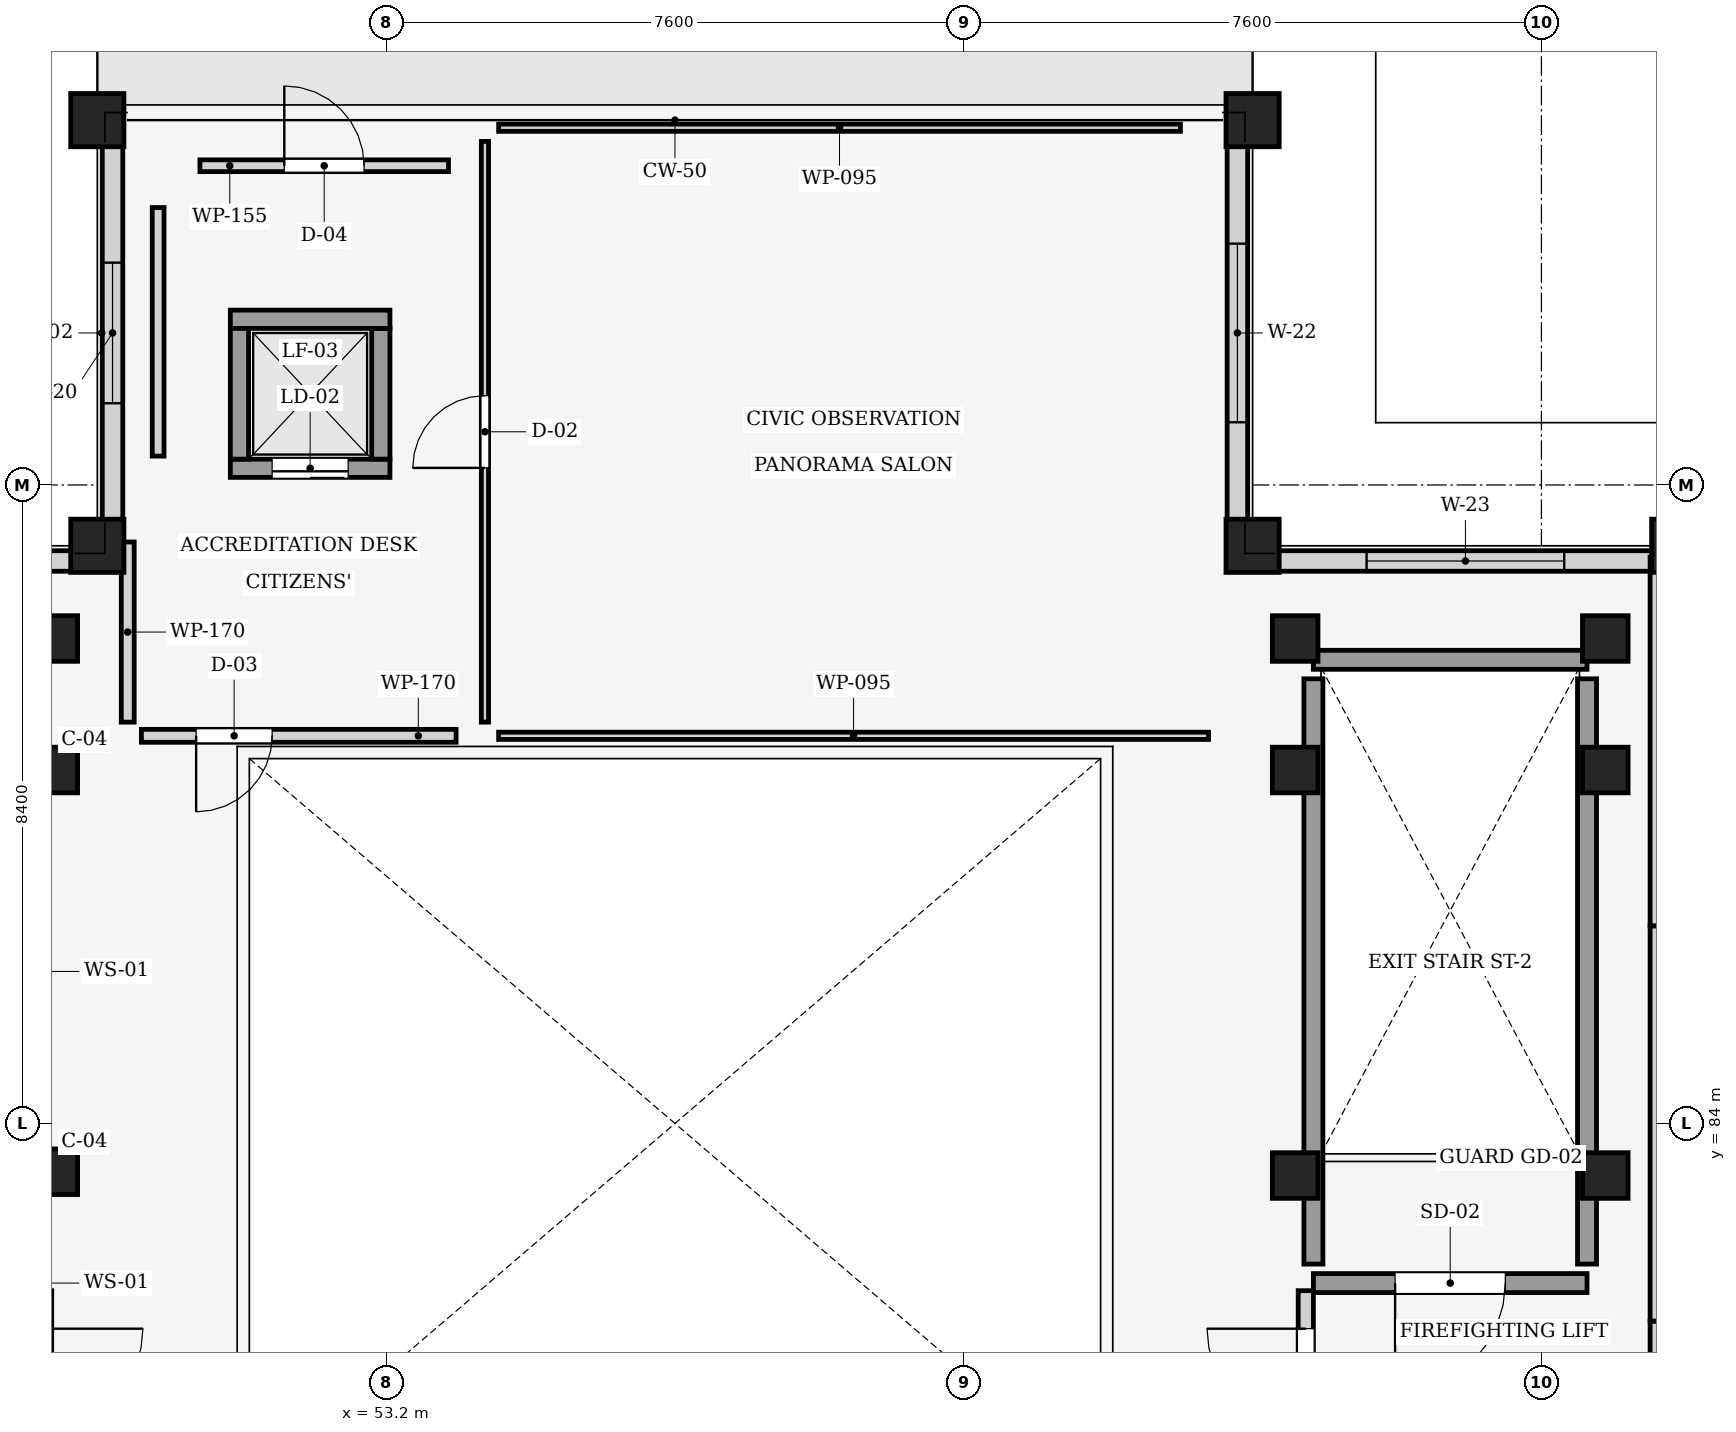
"""IFC4 building model, lengths in metres.
Left out: names, types, materials, properties, quantities, classifications, styles, units other than length and angle.
Written with IfcOpenShell. Run it as: python <this file> out.ifc"""

import sys

from ifc_helpers import new_model, si_unit, direction, frame, frame_2d, origin, origin_2d, place, context, subcontext, project, spatial, rectangle, extrude, element, fill, save


model = new_model("IFC4")
c1 = context("Model", 3, precision=1e-05, world=origin(), true_north=direction((0.0, 1.0)))
c2 = subcontext(c1, "Body", "Model", "MODEL_VIEW")
j1 = project(units=[si_unit("LENGTHUNIT", "METRE"), si_unit("PLANEANGLEUNIT", "RADIAN")], contexts=[c1])
p1 = place(None, origin())
s1 = spatial("IfcSite", under=j1, at=p1, CompositionType="ELEMENT")
p2 = place(p1, origin())
s2 = spatial("IfcBuilding", under=s1, at=p2, CompositionType="ELEMENT")
p3 = place(p2, frame((0.0, 0.0, 29.4)))
s3 = spatial("IfcBuildingStorey", under=s2, at=p3, CompositionType="ELEMENT", Elevation=29.4)
for number, where, z_axis, x_axis in (
    (1, (49.4, 91.6, 0.0), (0.0, 0.0, 1.0), (1.0, 0.0, 0.0)),
    (2, (49.4, 97.2, 0.0), (0.0, 0.0, 1.0), (1.0, 0.0, 0.0)),
    (3, (64.6, 91.6, 0.0), (0.0, 0.0, 1.0), (1.0, 0.0, 0.0)),
    (4, (64.6, 97.2, 0.0), (0.0, 0.0, 1.0), (1.0, 0.0, 0.0)),
):
    element("IfcColumn", number, at=place(p3, frame(where, z_axis=z_axis, x_axis=x_axis)), inside=s3, PredefinedType="COLUMN", context=c2, shape_type="SweptSolid", body=[
        extrude(rectangle(XDim=0.7, YDim=0.7, at=origin_2d()), origin(), (0.0, 0.0, 1.0), 5.0),
    ])
p4 = place(p3, frame((70.2, 91.6, 0.0), z_axis=(0.0, 0.0, 1.0), x_axis=(1.0, 0.0, 0.0)))
e5 = element("IfcColumn", 5, at=p4, inside=s3, PredefinedType="COLUMN", context=c2, shape_type="SweptSolid", body=[
    extrude(rectangle(XDim=0.7, YDim=0.7, at=origin_2d()), origin(), (0.0, 0.0, 1.0), 8.14),
])
for number, where, z_axis, x_axis in (
    (6, (48.84, 83.365, 0.0), (0.0, 0.0, 1.0), (1.0, 0.0, 0.0)),
    (7, (48.84, 88.65, 0.0), (0.0, 0.0, 1.0), (1.0, 0.0, 0.0)),
    (8, (48.84, 90.38, 0.0), (0.0, 0.0, 1.0), (1.0, 0.0, 0.0)),
    (9, (69.24, 83.315, 0.0), (0.0, 0.0, 1.0), (1.0, 0.0, 0.0)),
    (10, (65.16, 83.315, 0.0), (0.0, 0.0, 1.0), (1.0, 0.0, 0.0)),
    (11, (69.24, 88.65, 0.0), (0.0, 0.0, 1.0), (1.0, 0.0, 0.0)),
    (12, (65.16, 88.65, 0.0), (0.0, 0.0, 1.0), (1.0, 0.0, 0.0)),
    (13, (69.24, 90.38, 0.0), (0.0, 0.0, 1.0), (1.0, 0.0, 0.0)),
    (14, (65.16, 90.38, 0.0), (0.0, 0.0, 1.0), (1.0, 0.0, 0.0)),
):
    element("IfcColumn", number, at=place(p3, frame(where, z_axis=z_axis, x_axis=x_axis)), inside=s3, PredefinedType="COLUMN", context=c2, shape_type="SweptSolid", body=[
        extrude(rectangle(XDim=0.6, YDim=0.6, at=origin_2d()), origin(), (0.0, 0.0, 1.0), 4.75),
    ])
p5 = place(p3, frame((44.085, 91.4, 0.0), z_axis=(0.0, 0.0, 1.0), x_axis=(1.0, 0.0, 0.0)))
e15 = element("IfcWall", 15, at=p5, inside=s3, PredefinedType="STANDARD", context=c2, shape_type="SweptSolid", body=[
    extrude(rectangle(XDim=5.03, YDim=0.27, at=frame_2d((2.515, 0.0))), origin(), (0.0, 0.0, 1.0), 4.425),
])
p6 = place(p5, frame((1.715, 0.0, 0.85)))
e16 = element("IfcOpeningElement", 16, at=p6, cuts=e15, PredefinedType="OPENING", context=c2, shape_type="SweptSolid", body=[
    extrude(rectangle(XDim=1.6, YDim=1.65, at=frame_2d((0.8, 0.825))), frame((0.0, 0.145, 0.0), z_axis=(0.0, -1.0, 0.0), x_axis=(1.0, 0.0, 0.0)), (0.0, 0.0, 1.0), 0.29),
])
p7 = place(p3, frame((49.6, 91.885, 0.0), z_axis=(0.0, 0.0, 1.0), x_axis=(0.0, 1.0, 0.0)))
e17 = element("IfcWall", 17, at=p7, inside=s3, PredefinedType="STANDARD", context=c2, shape_type="SweptSolid", body=[
    extrude(rectangle(XDim=5.03, YDim=0.27, at=frame_2d((2.515, 0.0))), origin(), (0.0, 0.0, 1.0), 4.425),
])
p8 = place(p7, frame((1.59, 0.0, 0.85)))
e18 = element("IfcOpeningElement", 18, at=p8, cuts=e17, PredefinedType="OPENING", context=c2, shape_type="SweptSolid", body=[
    extrude(rectangle(XDim=1.85, YDim=1.65, at=frame_2d((0.925, 0.825))), frame((0.0, 0.145, 0.0), z_axis=(0.0, -1.0, 0.0), x_axis=(1.0, 0.0, 0.0)), (0.0, 0.0, 1.0), 0.29),
])
p9 = place(p3, frame((64.4, 96.915, 0.0), z_axis=(0.0, 0.0, 1.0), x_axis=(0.0, -1.0, 0.0)))
e19 = element("IfcWall", 19, at=p9, inside=s3, PredefinedType="STANDARD", context=c2, shape_type="SweptSolid", body=[
    extrude(rectangle(XDim=5.03, YDim=0.27, at=frame_2d((2.515, 0.0))), origin(), (0.0, 0.0, 1.0), 4.425),
])
p10 = place(p9, frame((1.34, 0.0, 0.85)))
e20 = element("IfcOpeningElement", 20, at=p10, cuts=e19, PredefinedType="OPENING", context=c2, shape_type="SweptSolid", body=[
    extrude(rectangle(XDim=2.35, YDim=1.65, at=frame_2d((1.175, 0.825))), frame((0.0, 0.145, 0.0), z_axis=(0.0, -1.0, 0.0), x_axis=(1.0, 0.0, 0.0)), (0.0, 0.0, 1.0), 0.29),
])
p11 = place(p3, frame((64.885, 91.4, 0.0), z_axis=(0.0, 0.0, 1.0), x_axis=(1.0, 0.0, 0.0)))
e21 = element("IfcWall", 21, at=p11, inside=s3, PredefinedType="STANDARD", context=c2, shape_type="SweptSolid", body=[
    extrude(rectangle(XDim=5.03, YDim=0.27, at=frame_2d((2.515, 0.0))), origin(), (0.0, 0.0, 1.0), 4.425),
])
p12 = place(p11, frame((1.215, 0.0, 0.85)))
e22 = element("IfcOpeningElement", 22, at=p12, cuts=e21, PredefinedType="OPENING", context=c2, shape_type="SweptSolid", body=[
    extrude(rectangle(XDim=2.6, YDim=1.65, at=frame_2d((1.3, 0.825))), frame((0.0, 0.145, 0.0), z_axis=(0.0, -1.0, 0.0), x_axis=(1.0, 0.0, 0.0)), (0.0, 0.0, 1.0), 0.29),
])
p13 = place(p3, frame((69.95, 81.4, 4.7), z_axis=(0.0, 0.0, 1.0), x_axis=(0.0, -1.0, 0.0)))
e23 = element("IfcWall", 23, at=p13, inside=s3, PredefinedType="STANDARD", context=c2, shape_type="SweptSolid", body=[
    extrude(rectangle(XDim=4.85, YDim=0.24, at=frame_2d((2.425, 0.0))), origin(), (0.0, 0.0, 1.0), 3.8),
])
p14 = place(p3, frame((69.95, 86.6, 4.7), z_axis=(0.0, 0.0, 1.0), x_axis=(0.0, -1.0, 0.0)))
e24 = element("IfcWall", 24, at=p14, inside=s3, PredefinedType="STANDARD", context=c2, shape_type="SweptSolid", body=[
    extrude(rectangle(XDim=5.2, YDim=0.24, at=frame_2d((2.6, 0.0))), origin(), (0.0, 0.0, 1.0), 4.85),
])
p15 = place(p3, frame((69.95, 91.45, 4.7), z_axis=(0.0, 0.0, 1.0), x_axis=(0.0, -1.0, 0.0)))
e25 = element("IfcWall", 25, at=p15, inside=s3, PredefinedType="STANDARD", context=c2, shape_type="SweptSolid", body=[
    extrude(rectangle(XDim=4.85, YDim=0.24, at=frame_2d((2.425, 0.0))), origin(), (0.0, 0.0, 1.0), 3.8),
])
p16 = place(p3, frame((69.0, 81.9, 0.0), z_axis=(0.0, 0.0, 1.0), x_axis=(-1.0, 0.0, 0.0)))
e26 = element("IfcWall", 26, at=p16, inside=s3, PredefinedType="SHEAR", context=c2, shape_type="SweptSolid", body=[
    extrude(rectangle(XDim=3.6, YDim=0.25, at=frame_2d((1.8, 0.0))), origin(), (0.0, 0.0, 1.0), 4.75),
])
p17 = place(p16, frame((1.075, 0.0, 0.0)))
e27 = element("IfcOpeningElement", 27, at=p17, cuts=e26, PredefinedType="OPENING", context=c2, shape_type="SweptSolid", body=[
    extrude(rectangle(XDim=1.45, YDim=2.2, at=frame_2d((0.725, 1.1))), frame((0.0, 0.135, 0.0), z_axis=(0.0, -1.0, 0.0), x_axis=(1.0, 0.0, 0.0)), (0.0, 0.0, 1.0), 0.27),
])
p18 = place(p3, frame((65.4, 82.15, 0.0), z_axis=(0.0, 0.0, 1.0), x_axis=(0.0, 1.0, 0.0)))
e28 = element("IfcWall", 28, at=p18, inside=s3, PredefinedType="SHEAR", context=c2, shape_type="SweptSolid", body=[
    extrude(rectangle(XDim=7.7, YDim=0.25, at=frame_2d((3.85, 0.0))), origin(), (0.0, 0.0, 1.0), 4.75),
])
p19 = place(p3, frame((65.4, 90.1, 0.0), z_axis=(0.0, 0.0, 1.0), x_axis=(1.0, 0.0, 0.0)))
e29 = element("IfcWall", 29, at=p19, inside=s3, PredefinedType="SHEAR", context=c2, shape_type="SweptSolid", body=[
    extrude(rectangle(XDim=3.6, YDim=0.25, at=frame_2d((1.8, 0.0))), origin(), (0.0, 0.0, 1.0), 4.75),
])
p20 = place(p3, frame((69.0, 89.85, 0.0), z_axis=(0.0, 0.0, 1.0), x_axis=(0.0, -1.0, 0.0)))
e30 = element("IfcWall", 30, at=p20, inside=s3, PredefinedType="SHEAR", context=c2, shape_type="SweptSolid", body=[
    extrude(rectangle(XDim=7.7, YDim=0.25, at=frame_2d((3.85, 0.0))), origin(), (0.0, 0.0, 1.0), 4.75),
])
p21 = place(p3, frame((65.3, 79.5, 0.0), z_axis=(0.0, 0.0, 1.0), x_axis=(0.0, 1.0, 0.0)))
e31 = element("IfcWall", 31, at=p21, inside=s3, PredefinedType="PARTITIONING", context=c2, shape_type="SweptSolid", body=[
    extrude(rectangle(XDim=2.3, YDim=0.2, at=frame_2d((1.15, 0.0))), origin(), (0.0, 0.0, 1.0), 2.9),
])
p22 = place(p21, frame((0.5, 0.0, 0.0)))
e32 = element("IfcOpeningElement", 32, at=p22, cuts=e31, PredefinedType="OPENING", context=c2, shape_type="SweptSolid", body=[
    extrude(rectangle(XDim=1.3, YDim=2.2, at=frame_2d((0.65, 1.1))), frame((0.0, 0.11, 0.0), z_axis=(0.0, -1.0, 0.0), x_axis=(1.0, 0.0, 0.0)), (0.0, 0.0, 1.0), 0.22),
])
p23 = place(p3, frame((53.25, 92.62, 0.0), z_axis=(0.0, 0.0, 1.0), x_axis=(-1.0, 0.0, 0.0)))
e33 = element("IfcWall", 33, at=p23, inside=s3, PredefinedType="SHEAR", context=c2, shape_type="SweptSolid", body=[
    extrude(rectangle(XDim=2.1, YDim=0.24, at=frame_2d((1.05, 0.0))), origin(), (0.0, 0.0, 1.0), 4.75),
])
p24 = place(p23, frame((0.55, 0.0, 0.0)))
e34 = element("IfcOpeningElement", 34, at=p24, cuts=e33, PredefinedType="OPENING", context=c2, shape_type="SweptSolid", body=[
    extrude(rectangle(XDim=1.0, YDim=2.15, at=frame_2d((0.5, 1.075))), frame((0.0, 0.13, 0.0), z_axis=(0.0, -1.0, 0.0), x_axis=(1.0, 0.0, 0.0)), (0.0, 0.0, 1.0), 0.26),
])
p25 = place(p3, frame((53.13, 94.46, 0.0), z_axis=(0.0, 0.0, 1.0), x_axis=(0.0, -1.0, 0.0)))
e35 = element("IfcWall", 35, at=p25, inside=s3, PredefinedType="SHEAR", context=c2, shape_type="SweptSolid", body=[
    extrude(rectangle(XDim=1.72, YDim=0.24, at=frame_2d((0.86, 0.0))), origin(), (0.0, 0.0, 1.0), 4.75),
])
p26 = place(p3, frame((51.15, 94.58, 0.0), z_axis=(0.0, 0.0, 1.0), x_axis=(1.0, 0.0, 0.0)))
e36 = element("IfcWall", 36, at=p26, inside=s3, PredefinedType="SHEAR", context=c2, shape_type="SweptSolid", body=[
    extrude(rectangle(XDim=2.1, YDim=0.24, at=frame_2d((1.05, 0.0))), origin(), (0.0, 0.0, 1.0), 4.75),
])
p27 = place(p3, frame((51.27, 92.74, 0.0), z_axis=(0.0, 0.0, 1.0), x_axis=(0.0, 1.0, 0.0)))
e37 = element("IfcWall", 37, at=p27, inside=s3, PredefinedType="SHEAR", context=c2, shape_type="SweptSolid", body=[
    extrude(rectangle(XDim=1.72, YDim=0.24, at=frame_2d((0.86, 0.0))), origin(), (0.0, 0.0, 1.0), 4.75),
])
p28 = place(p3, frame((64.02, 89.1, 0.0), z_axis=(0.0, 0.0, 1.0), x_axis=(-1.0, 0.0, 0.0)))
e38 = element("IfcWall", 38, at=p28, inside=s3, PredefinedType="PARTITIONING", context=c2, shape_type="SweptSolid", body=[
    extrude(rectangle(XDim=9.34, YDim=0.095, at=frame_2d((4.67, 0.0))), origin(), (0.0, 0.0, 1.0), 4.57),
])
p29 = place(p3, frame((54.5, 89.28, 0.0), z_axis=(0.0, 0.0, 1.0), x_axis=(0.0, 1.0, 0.0)))
e39 = element("IfcWall", 39, at=p29, inside=s3, PredefinedType="PARTITIONING", context=c2, shape_type="SweptSolid", body=[
    extrude(rectangle(XDim=7.64, YDim=0.095, at=frame_2d((3.82, 0.0))), origin(), (0.0, 0.0, 1.0), 4.425),
])
p30 = place(p29, frame((3.345, 0.0, 0.0)))
e40 = element("IfcOpeningElement", 40, at=p30, cuts=e39, PredefinedType="OPENING", context=c2, shape_type="SweptSolid", body=[
    extrude(rectangle(XDim=0.95, YDim=2.1, at=frame_2d((0.475, 1.05))), frame((0.0, 0.057, 0.0), z_axis=(0.0, -1.0, 0.0), x_axis=(1.0, 0.0, 0.0)), (0.0, 0.0, 1.0), 0.115),
])
p31 = place(p3, frame((54.68, 97.1, 0.0), z_axis=(0.0, 0.0, 1.0), x_axis=(1.0, 0.0, 0.0)))
e41 = element("IfcWall", 41, at=p31, inside=s3, PredefinedType="PARTITIONING", context=c2, shape_type="SweptSolid", body=[
    extrude(rectangle(XDim=8.97, YDim=0.095, at=frame_2d((4.485, 0.0))), origin(), (0.0, 0.0, 1.0), 4.425),
])
p32 = place(p3, frame((54.12, 89.1, 0.0), z_axis=(0.0, 0.0, 1.0), x_axis=(-1.0, 0.0, 0.0)))
e42 = element("IfcWall", 42, at=p32, inside=s3, PredefinedType="PARTITIONING", context=c2, shape_type="SweptSolid", body=[
    extrude(rectangle(XDim=4.14, YDim=0.17, at=frame_2d((2.07, 0.0))), origin(), (0.0, 0.0, 1.0), 4.57),
])
p33 = place(p32, frame((2.42, 0.0, 0.0)))
e43 = element("IfcOpeningElement", 43, at=p33, cuts=e42, PredefinedType="OPENING", context=c2, shape_type="SweptSolid", body=[
    extrude(rectangle(XDim=1.0, YDim=2.1, at=frame_2d((0.5, 1.05))), frame((0.0, 0.095, 0.0), z_axis=(0.0, -1.0, 0.0), x_axis=(1.0, 0.0, 0.0)), (0.0, 0.0, 1.0), 0.19),
])
p34 = place(p3, frame((49.8, 89.28, 0.0), z_axis=(0.0, 0.0, 1.0), x_axis=(0.0, 1.0, 0.0)))
e44 = element("IfcWall", 44, at=p34, inside=s3, PredefinedType="PARTITIONING", context=c2, shape_type="SweptSolid", body=[
    extrude(rectangle(XDim=2.37, YDim=0.17, at=frame_2d((1.185, 0.0))), origin(), (0.0, 0.0, 1.0), 4.57),
])
p35 = place(p3, frame((50.2, 92.78, 0.0), z_axis=(0.0, 0.0, 1.0), x_axis=(0.0, 1.0, 0.0)))
e45 = element("IfcWall", 45, at=p35, inside=s3, PredefinedType="PARTITIONING", context=c2, shape_type="SweptSolid", body=[
    extrude(rectangle(XDim=3.27, YDim=0.155, at=frame_2d((1.635, 0.0))), origin(), (0.0, 0.0, 1.0), 4.57),
])
p36 = place(p3, frame((50.75, 96.6, 0.0), z_axis=(0.0, 0.0, 1.0), x_axis=(1.0, 0.0, 0.0)))
e46 = element("IfcWall", 46, at=p36, inside=s3, PredefinedType="PARTITIONING", context=c2, shape_type="SweptSolid", body=[
    extrude(rectangle(XDim=3.27, YDim=0.155, at=frame_2d((1.635, 0.0))), origin(), (0.0, 0.0, 1.0), 4.57),
])
p37 = place(p36, frame((1.11, 0.0, 0.0)))
e47 = element("IfcOpeningElement", 47, at=p37, cuts=e46, PredefinedType="OPENING", context=c2, shape_type="SweptSolid", body=[
    extrude(rectangle(XDim=1.05, YDim=2.1, at=frame_2d((0.525, 1.05))), frame((0.0, 0.087, 0.0), z_axis=(0.0, -1.0, 0.0), x_axis=(1.0, 0.0, 0.0)), (0.0, 0.0, 1.0), 0.175),
])
p38 = place(p8, origin())
e48 = element("IfcWindow", 48, at=p38, inside=s3, PartitioningType="SINGLE_PANEL", PredefinedType="WINDOW", context=c2, shape_type="SweptSolid", body=[
    extrude(rectangle(XDim=1.85, YDim=1.65, at=frame_2d((0.925, 0.825))), frame((0.0, 0.03, 0.0), z_axis=(0.0, -1.0, 0.0), x_axis=(1.0, 0.0, 0.0)), (0.0, 0.0, 1.0), 0.06),
])
fill(e18, e48)
p39 = place(p10, origin())
e49 = element("IfcWindow", 49, at=p39, inside=s3, PartitioningType="SINGLE_PANEL", PredefinedType="WINDOW", context=c2, shape_type="SweptSolid", body=[
    extrude(rectangle(XDim=2.35, YDim=1.65, at=frame_2d((1.175, 0.825))), frame((0.0, 0.03, 0.0), z_axis=(0.0, -1.0, 0.0), x_axis=(1.0, 0.0, 0.0)), (0.0, 0.0, 1.0), 0.06),
])
fill(e20, e49)
p40 = place(p12, origin())
e50 = element("IfcWindow", 50, at=p40, inside=s3, PartitioningType="SINGLE_PANEL", PredefinedType="WINDOW", context=c2, shape_type="SweptSolid", body=[
    extrude(rectangle(XDim=2.6, YDim=1.65, at=frame_2d((1.3, 0.825))), frame((0.0, 0.03, 0.0), z_axis=(0.0, -1.0, 0.0), x_axis=(1.0, 0.0, 0.0)), (0.0, 0.0, 1.0), 0.06),
])
fill(e22, e50)
p41 = place(p17, origin())
e51 = element("IfcDoor", 51, at=p41, inside=s3, OperationType="SINGLE_SWING_RIGHT", PredefinedType="DOOR", context=c2, shape_type="SweptSolid", body=[
    extrude(rectangle(XDim=1.45, YDim=2.2, at=frame_2d((0.725, 1.1))), frame((0.0, 0.025, 0.0), z_axis=(0.0, -1.0, 0.0), x_axis=(1.0, 0.0, 0.0)), (0.0, 0.0, 1.0), 0.05),
])
fill(e27, e51)
p42 = place(p22, origin())
e52 = element("IfcDoor", 52, at=p42, inside=s3, OperationType="SINGLE_SWING_RIGHT", PredefinedType="DOOR", context=c2, shape_type="SweptSolid", body=[
    extrude(rectangle(XDim=1.3, YDim=2.2, at=frame_2d((0.65, 1.1))), frame((0.0, 0.025, 0.0), z_axis=(0.0, -1.0, 0.0), x_axis=(1.0, 0.0, 0.0)), (0.0, 0.0, 1.0), 0.05),
])
fill(e32, e52)
p43 = place(p24, origin())
e53 = element("IfcDoor", 53, at=p43, inside=s3, OperationType="SLIDING_TO_LEFT", PredefinedType="DOOR", context=c2, shape_type="SweptSolid", body=[
    extrude(rectangle(XDim=1.0, YDim=2.15, at=frame_2d((0.5, 1.075))), frame((0.0, 0.025, 0.0), z_axis=(0.0, -1.0, 0.0), x_axis=(1.0, 0.0, 0.0)), (0.0, 0.0, 1.0), 0.05),
])
fill(e34, e53)
p44 = place(p30, origin())
e54 = element("IfcDoor", 54, at=p44, inside=s3, OperationType="SINGLE_SWING_LEFT", PredefinedType="DOOR", context=c2, shape_type="SweptSolid", body=[
    extrude(rectangle(XDim=0.95, YDim=2.1, at=frame_2d((0.475, 1.05))), frame((0.0, 0.025, 0.0), z_axis=(0.0, -1.0, 0.0), x_axis=(1.0, 0.0, 0.0)), (0.0, 0.0, 1.0), 0.05),
])
fill(e40, e54)
p45 = place(p33, origin())
e55 = element("IfcDoor", 55, at=p45, inside=s3, OperationType="SINGLE_SWING_RIGHT", PredefinedType="DOOR", context=c2, shape_type="SweptSolid", body=[
    extrude(rectangle(XDim=1.0, YDim=2.1, at=frame_2d((0.5, 1.05))), frame((0.0, 0.025, 0.0), z_axis=(0.0, -1.0, 0.0), x_axis=(1.0, 0.0, 0.0)), (0.0, 0.0, 1.0), 0.05),
])
fill(e43, e55)
p46 = place(p37, origin())
e56 = element("IfcDoor", 56, at=p46, inside=s3, OperationType="SINGLE_SWING_LEFT", PredefinedType="DOOR", context=c2, shape_type="SweptSolid", body=[
    extrude(rectangle(XDim=1.05, YDim=2.1, at=frame_2d((0.525, 1.05))), frame((0.0, 0.025, 0.0), z_axis=(0.0, -1.0, 0.0), x_axis=(1.0, 0.0, 0.0)), (0.0, 0.0, 1.0), 0.05),
])
fill(e47, e56)
save(model, sys.argv[1])
